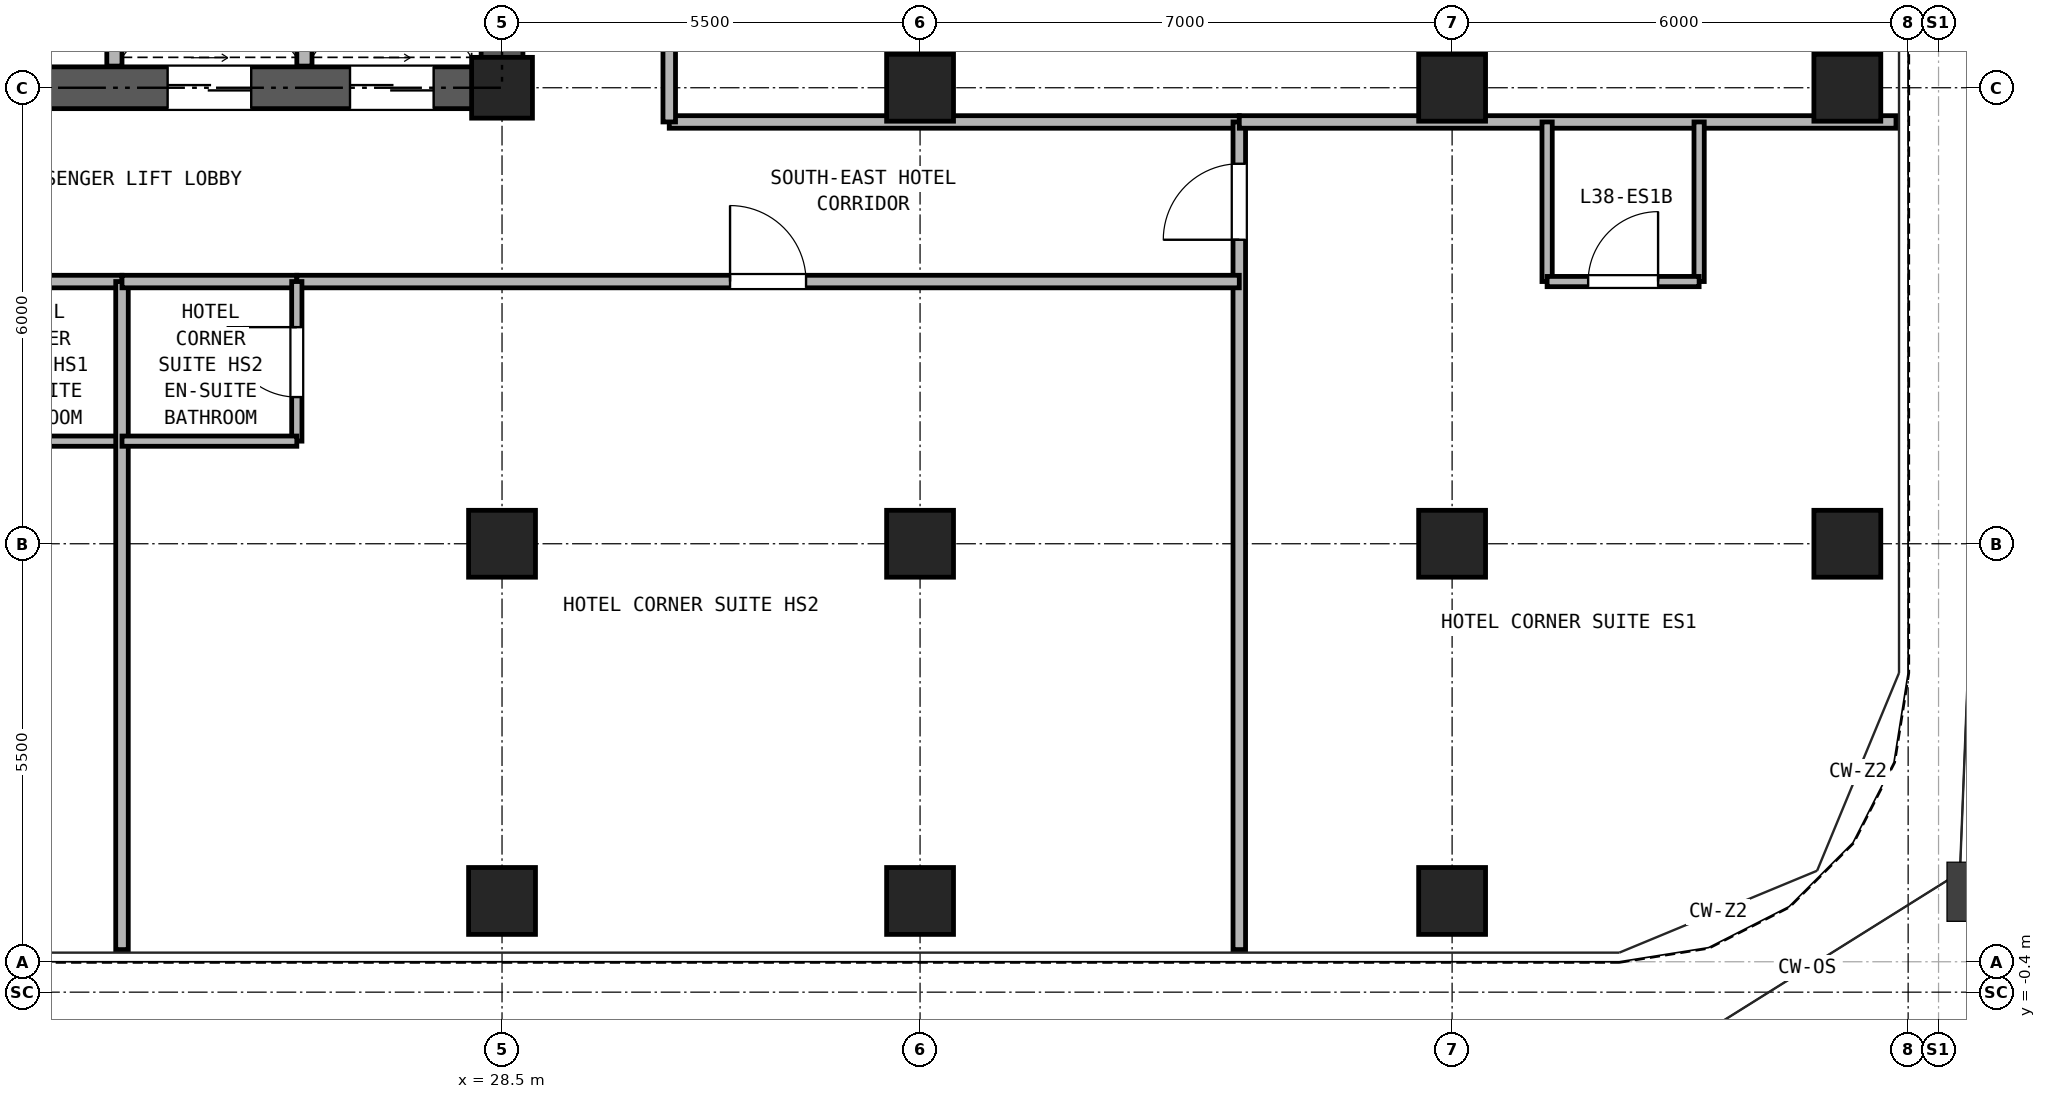
"""IFC4 building model, lengths in metres.
Left out: names, types, materials, properties, quantities, classifications, styles, units other than length and angle.
Written with IfcOpenShell. Run it as: python <this file> out.ifc"""

import sys

from ifc_helpers import new_model, si_unit, direction, frame, frame_2d, origin, origin_2d, place, context, subcontext, project, spatial, rectangle, hollow_rectangle, extrude, source, transform, mapped, element, fill, save


model = new_model("IFC4")
c1 = context("Model", 3, precision=1e-05, world=origin(), true_north=direction((0.0, 1.0)))
c2 = subcontext(c1, "Body", "Model", "MODEL_VIEW")
j1 = project(units=[si_unit("LENGTHUNIT", "METRE"), si_unit("PLANEANGLEUNIT", "RADIAN")], contexts=[c1])
p1 = place(None, origin())
s1 = spatial("IfcSite", under=j1, at=p1, CompositionType="ELEMENT")
p2 = place(p1, origin())
s2 = spatial("IfcBuilding", under=s1, at=p2, CompositionType="ELEMENT")
p3 = place(p2, frame((0.0, 0.0, 137.5)))
s3 = spatial("IfcBuildingStorey", under=s2, at=p3, CompositionType="ELEMENT", Elevation=137.5)
m1 = source(origin(), c2, "Body", "SweptSolid", [
    extrude(hollow_rectangle(XDim=0.88, YDim=0.88, WallThickness=0.05, at=origin_2d()), origin(), (0.0, 0.0, 1.0), 2.95),
])
for number, where, z_axis, x_axis in (
    (1, (28.5, 0.8, 0.0), (0.0, 0.0, 1.0), (1.0, 0.0, 0.0)),
    (2, (34.0, 0.8, 0.0), (0.0, 0.0, 1.0), (1.0, 0.0, 0.0)),
    (3, (41.0, 0.8, 0.0), (0.0, 0.0, 1.0), (1.0, 0.0, 0.0)),
    (4, (46.2, 5.5, 0.0), (0.0, 0.0, 1.0), (1.0, 0.0, 0.0)),
    (5, (46.2, 11.5, 0.0), (0.0, 0.0, 1.0), (1.0, 0.0, 0.0)),
    (6, (28.5, 5.5, 0.0), (0.0, 0.0, 1.0), (1.0, 0.0, 0.0)),
):
    element("IfcColumn", number, at=place(p3, frame(where, z_axis=z_axis, x_axis=x_axis)), inside=s3, PredefinedType="COLUMN", context=c2, shape_type="MappedRepresentation", body=[
        mapped(m1, transform((0.0, 0.0, 0.0), x_axis=(1.0, 0.0, 0.0), y_axis=(0.0, 1.0, 0.0), z_axis=(0.0, 0.0, 1.0), scale=1.0)),
    ])
m2 = source(origin(), c2, "Body", "SweptSolid", [
    extrude(hollow_rectangle(XDim=0.8, YDim=0.8, WallThickness=0.045, at=origin_2d()), origin(), (0.0, 0.0, 1.0), 2.95),
])
p4 = place(p3, frame((28.5, 11.5, 0.0), z_axis=(0.0, 0.0, 1.0), x_axis=(1.0, 0.0, 0.0)))
e7 = element("IfcColumn", 7, at=p4, inside=s3, PredefinedType="COLUMN", context=c2, shape_type="MappedRepresentation", body=[
    mapped(m2, transform((0.0, 0.0, 0.0), x_axis=(1.0, 0.0, 0.0), y_axis=(0.0, 1.0, 0.0), z_axis=(0.0, 0.0, 1.0), scale=1.0)),
])
for number, where, z_axis, x_axis in (
    (8, (34.0, 5.5, 0.0), (0.0, 0.0, 1.0), (1.0, 0.0, 0.0)),
    (9, (34.0, 11.5, 0.0), (0.0, 0.0, 1.0), (1.0, 0.0, 0.0)),
    (10, (41.0, 5.5, 0.0), (0.0, 0.0, 1.0), (1.0, 0.0, 0.0)),
    (11, (41.0, 11.5, 0.0), (0.0, 0.0, 1.0), (1.0, 0.0, 0.0)),
):
    element("IfcColumn", number, at=place(p3, frame(where, z_axis=z_axis, x_axis=x_axis)), inside=s3, PredefinedType="COLUMN", context=c2, shape_type="MappedRepresentation", body=[
        mapped(m1, transform((0.0, 0.0, 0.0), x_axis=(1.0, 0.0, 0.0), y_axis=(0.0, 1.0, 0.0), z_axis=(0.0, 0.0, 1.0), scale=1.0)),
    ])
p5 = place(p3, frame((18.225, 11.5, 0.0), z_axis=(0.0, 0.0, 1.0), x_axis=(1.0, 0.0, 0.0)))
e12 = element("IfcWall", 12, at=p5, inside=s3, PredefinedType="SHEAR", context=c2, shape_type="SweptSolid", body=[
    extrude(rectangle(XDim=10.55, YDim=0.55, at=frame_2d((5.275, 0.0))), origin(), (0.0, 0.0, 1.0), 2.95),
])
p6 = place(p5, frame((2.375, 0.0, 0.0)))
e13 = element("IfcOpeningElement", 13, at=p6, cuts=e12, PredefinedType="OPENING", context=c2, shape_type="SweptSolid", body=[
    extrude(rectangle(XDim=0.95, YDim=2.15, at=frame_2d((0.475, 1.075))), frame((0.0, 0.285, 0.0), z_axis=(0.0, -1.0, 0.0), x_axis=(1.0, 0.0, 0.0)), (0.0, 0.0, 1.0), 0.57),
])
p7 = place(p5, frame((5.875, 0.0, 0.0)))
e14 = element("IfcOpeningElement", 14, at=p7, cuts=e12, PredefinedType="OPENING", context=c2, shape_type="SweptSolid", body=[
    extrude(rectangle(XDim=1.1, YDim=2.25, at=frame_2d((0.55, 1.125))), frame((0.0, 0.285, 0.0), z_axis=(0.0, -1.0, 0.0), x_axis=(1.0, 0.0, 0.0)), (0.0, 0.0, 1.0), 0.57),
])
p8 = place(p5, frame((8.275, 0.0, 0.0)))
e15 = element("IfcOpeningElement", 15, at=p8, cuts=e12, PredefinedType="OPENING", context=c2, shape_type="SweptSolid", body=[
    extrude(rectangle(XDim=1.1, YDim=2.25, at=frame_2d((0.55, 1.125))), frame((0.0, 0.285, 0.0), z_axis=(0.0, -1.0, 0.0), x_axis=(1.0, 0.0, 0.0)), (0.0, 0.0, 1.0), 0.57),
])
p9 = place(p3, frame((28.5, 11.775, 0.0), z_axis=(0.0, 0.0, 1.0), x_axis=(0.0, 1.0, 0.0)))
e16 = element("IfcWall", 16, at=p9, inside=s3, PredefinedType="SHEAR", context=c2, shape_type="SweptSolid", body=[
    extrude(rectangle(XDim=16.7, YDim=0.55, at=frame_2d((8.35, 0.0))), origin(), (0.0, 0.0, 1.0), 2.95),
])
p10 = place(p9, frame((7.375, 0.0, 0.0)))
e17 = element("IfcOpeningElement", 17, at=p10, cuts=e16, PredefinedType="OPENING", context=c2, shape_type="SweptSolid", body=[
    extrude(rectangle(XDim=1.15, YDim=2.2, at=frame_2d((0.575, 1.1))), frame((0.0, 0.285, 0.0), z_axis=(0.0, -1.0, 0.0), x_axis=(1.0, 0.0, 0.0)), (0.0, 0.0, 1.0), 0.57),
])
for number, where, z_axis, x_axis in (
    (18, (23.4, 11.785, 0.0), (0.0, 0.0, 1.0), (0.0, 1.0, 0.0)),
    (19, (25.9, 11.785, 0.0), (0.0, 0.0, 1.0), (0.0, 1.0, 0.0)),
):
    element("IfcWall", number, at=place(p3, frame(where, z_axis=z_axis, x_axis=x_axis)), inside=s3, PredefinedType="PARTITIONING", context=c2, shape_type="SweptSolid", body=[
        extrude(rectangle(XDim=3.215, YDim=0.2, at=frame_2d((1.607, 0.0))), origin(), (0.0, 0.0, 1.0), 2.95),
    ])
p11 = place(p3, frame((30.7, 11.05, 0.0), z_axis=(0.0, 0.0, 1.0), x_axis=(1.0, 0.0, 0.0)))
e20 = element("IfcWall", 20, at=p11, inside=s3, PredefinedType="PARTITIONING", context=c2, shape_type="SweptSolid", body=[
    extrude(rectangle(XDim=7.5, YDim=0.165, at=frame_2d((3.75, 0.0))), origin(), (0.0, 0.0, 1.0), 2.95),
])
p12 = place(p3, frame((30.7, 11.05, 0.0), z_axis=(0.0, 0.0, 1.0), x_axis=(0.0, 1.0, 0.0)))
e21 = element("IfcWall", 21, at=p12, inside=s3, PredefinedType="PARTITIONING", context=c2, shape_type="SweptSolid", body=[
    extrude(rectangle(XDim=18.2, YDim=0.165, at=frame_2d((9.1, 0.0))), origin(), (0.0, 0.0, 1.0), 2.95),
])
p13 = place(p12, frame((4.05, 0.0, 0.0)))
e22 = element("IfcOpeningElement", 22, at=p13, cuts=e21, PredefinedType="OPENING", context=c2, shape_type="SweptSolid", body=[
    extrude(rectangle(XDim=0.95, YDim=2.15, at=frame_2d((0.475, 1.075))), frame((0.0, 0.093, 0.0), z_axis=(0.0, -1.0, 0.0), x_axis=(1.0, 0.0, 0.0)), (0.0, 0.0, 1.0), 0.185),
])
p14 = place(p12, frame((13.15, 0.0, 0.0)))
e23 = element("IfcOpeningElement", 23, at=p14, cuts=e21, PredefinedType="OPENING", context=c2, shape_type="SweptSolid", body=[
    extrude(rectangle(XDim=0.95, YDim=2.15, at=frame_2d((0.475, 1.075))), frame((0.0, 0.093, 0.0), z_axis=(0.0, -1.0, 0.0), x_axis=(1.0, 0.0, 0.0)), (0.0, 0.0, 1.0), 0.185),
])
p15 = place(p3, frame((38.2, 0.16, 0.0), z_axis=(0.0, 0.0, 1.0), x_axis=(0.0, 1.0, 0.0)))
e24 = element("IfcWall", 24, at=p15, inside=s3, PredefinedType="PARTITIONING", context=c2, shape_type="SweptSolid", body=[
    extrude(rectangle(XDim=10.89, YDim=0.165, at=frame_2d((5.445, 0.0))), origin(), (0.0, 0.0, 1.0), 2.95),
])
p16 = place(p15, frame((9.34, 0.0, 0.0)))
e25 = element("IfcOpeningElement", 25, at=p16, cuts=e24, PredefinedType="OPENING", context=c2, shape_type="SweptSolid", body=[
    extrude(rectangle(XDim=1.0, YDim=2.15, at=frame_2d((0.5, 1.075))), frame((0.0, 0.093, 0.0), z_axis=(0.0, -1.0, 0.0), x_axis=(1.0, 0.0, 0.0)), (0.0, 0.0, 1.0), 0.185),
])
p17 = place(p3, frame((38.2, 11.05, 0.0), z_axis=(0.0, 0.0, 1.0), x_axis=(1.0, 0.0, 0.0)))
e26 = element("IfcWall", 26, at=p17, inside=s3, PredefinedType="PARTITIONING", context=c2, shape_type="SweptSolid", body=[
    extrude(rectangle(XDim=8.64, YDim=0.165, at=frame_2d((4.32, 0.0))), origin(), (0.0, 0.0, 1.0), 2.95),
])
for number, where, z_axis, x_axis in (
    (27, (42.25, 8.95, 0.0), (0.0, 0.0, 1.0), (0.0, 1.0, 0.0)),
    (28, (44.25, 8.95, 0.0), (0.0, 0.0, 1.0), (0.0, 1.0, 0.0)),
):
    element("IfcWall", number, at=place(p3, frame(where, z_axis=z_axis, x_axis=x_axis)), inside=s3, PredefinedType="PARTITIONING", context=c2, shape_type="SweptSolid", body=[
        extrude(rectangle(XDim=2.1, YDim=0.135, at=frame_2d((1.05, 0.0))), origin(), (0.0, 0.0, 1.0), 2.95),
    ])
p18 = place(p3, frame((42.25, 8.95, 0.0), z_axis=(0.0, 0.0, 1.0), x_axis=(1.0, 0.0, 0.0)))
e29 = element("IfcWall", 29, at=p18, inside=s3, PredefinedType="PARTITIONING", context=c2, shape_type="SweptSolid", body=[
    extrude(rectangle(XDim=2.0, YDim=0.135, at=frame_2d((1.0, 0.0))), origin(), (0.0, 0.0, 1.0), 2.95),
])
p19 = place(p18, frame((0.54, 0.0, 0.0)))
e30 = element("IfcOpeningElement", 30, at=p19, cuts=e29, PredefinedType="OPENING", context=c2, shape_type="SweptSolid", body=[
    extrude(rectangle(XDim=0.92, YDim=2.1, at=frame_2d((0.46, 1.05))), frame((0.0, 0.077, 0.0), z_axis=(0.0, -1.0, 0.0), x_axis=(1.0, 0.0, 0.0)), (0.0, 0.0, 1.0), 0.155),
])
p20 = place(p3, frame((21.2, 8.95, 0.0), z_axis=(0.0, 0.0, 1.0), x_axis=(1.0, 0.0, 0.0)))
e31 = element("IfcWall", 31, at=p20, inside=s3, PredefinedType="PARTITIONING", context=c2, shape_type="SweptSolid", body=[
    extrude(rectangle(XDim=2.3, YDim=0.165, at=frame_2d((1.15, 0.0))), origin(), (0.0, 0.0, 1.0), 2.95),
])
p21 = place(p3, frame((21.2, 6.85, 0.0), z_axis=(0.0, 0.0, 1.0), x_axis=(1.0, 0.0, 0.0)))
e32 = element("IfcWall", 32, at=p21, inside=s3, PredefinedType="PARTITIONING", context=c2, shape_type="SweptSolid", body=[
    extrude(rectangle(XDim=2.3, YDim=0.135, at=frame_2d((1.15, 0.0))), origin(), (0.0, 0.0, 1.0), 2.95),
])
p22 = place(p3, frame((23.5, 0.16, 0.0), z_axis=(0.0, 0.0, 1.0), x_axis=(0.0, 1.0, 0.0)))
e33 = element("IfcWall", 33, at=p22, inside=s3, PredefinedType="PARTITIONING", context=c2, shape_type="SweptSolid", body=[
    extrude(rectangle(XDim=8.79, YDim=0.165, at=frame_2d((4.395, 0.0))), origin(), (0.0, 0.0, 1.0), 2.95),
])
p23 = place(p3, frame((23.5, 8.95, 0.0), z_axis=(0.0, 0.0, 1.0), x_axis=(1.0, 0.0, 0.0)))
e34 = element("IfcWall", 34, at=p23, inside=s3, PredefinedType="PARTITIONING", context=c2, shape_type="SweptSolid", body=[
    extrude(rectangle(XDim=2.3, YDim=0.165, at=frame_2d((1.15, 0.0))), origin(), (0.0, 0.0, 1.0), 2.95),
])
p24 = place(p3, frame((25.8, 8.95, 0.0), z_axis=(0.0, 0.0, 1.0), x_axis=(1.0, 0.0, 0.0)))
e35 = element("IfcWall", 35, at=p24, inside=s3, PredefinedType="PARTITIONING", context=c2, shape_type="SweptSolid", body=[
    extrude(rectangle(XDim=12.4, YDim=0.165, at=frame_2d((6.2, 0.0))), origin(), (0.0, 0.0, 1.0), 2.95),
])
p25 = place(p24, frame((5.7, 0.0, 0.0)))
e36 = element("IfcOpeningElement", 36, at=p25, cuts=e35, PredefinedType="OPENING", context=c2, shape_type="SweptSolid", body=[
    extrude(rectangle(XDim=1.0, YDim=2.15, at=frame_2d((0.5, 1.075))), frame((0.0, 0.093, 0.0), z_axis=(0.0, -1.0, 0.0), x_axis=(1.0, 0.0, 0.0)), (0.0, 0.0, 1.0), 0.185),
])
p26 = place(p3, frame((25.8, 6.85, 0.0), z_axis=(0.0, 0.0, 1.0), x_axis=(0.0, 1.0, 0.0)))
e37 = element("IfcWall", 37, at=p26, inside=s3, PredefinedType="PARTITIONING", context=c2, shape_type="SweptSolid", body=[
    extrude(rectangle(XDim=2.1, YDim=0.135, at=frame_2d((1.05, 0.0))), origin(), (0.0, 0.0, 1.0), 2.95),
])
p27 = place(p26, frame((0.58, 0.0, 0.0)))
e38 = element("IfcOpeningElement", 38, at=p27, cuts=e37, PredefinedType="OPENING", context=c2, shape_type="SweptSolid", body=[
    extrude(rectangle(XDim=0.92, YDim=2.1, at=frame_2d((0.46, 1.05))), frame((0.0, 0.077, 0.0), z_axis=(0.0, -1.0, 0.0), x_axis=(1.0, 0.0, 0.0)), (0.0, 0.0, 1.0), 0.155),
])
p28 = place(p3, frame((23.5, 6.85, 0.0), z_axis=(0.0, 0.0, 1.0), x_axis=(1.0, 0.0, 0.0)))
e39 = element("IfcWall", 39, at=p28, inside=s3, PredefinedType="PARTITIONING", context=c2, shape_type="SweptSolid", body=[
    extrude(rectangle(XDim=2.3, YDim=0.135, at=frame_2d((1.15, 0.0))), origin(), (0.0, 0.0, 1.0), 2.95),
])
p29 = place(p7, frame((1.1, 0.0, 0.0), z_axis=(0.0, 0.0, 1.0), x_axis=(-1.0, 0.0, 0.0)))
e40 = element("IfcDoor", 40, at=p29, inside=s3, OperationType="DOUBLE_DOOR_SLIDING", PredefinedType="DOOR", context=c2, shape_type="SweptSolid", body=[
    extrude(rectangle(XDim=1.1, YDim=2.25, at=frame_2d((0.55, 1.125))), frame((0.0, 0.025, 0.0), z_axis=(0.0, -1.0, 0.0), x_axis=(1.0, 0.0, 0.0)), (0.0, 0.0, 1.0), 0.05),
])
fill(e14, e40)
p30 = place(p8, frame((1.1, 0.0, 0.0), z_axis=(0.0, 0.0, 1.0), x_axis=(-1.0, 0.0, 0.0)))
e41 = element("IfcDoor", 41, at=p30, inside=s3, OperationType="DOUBLE_DOOR_SLIDING", PredefinedType="DOOR", context=c2, shape_type="SweptSolid", body=[
    extrude(rectangle(XDim=1.1, YDim=2.25, at=frame_2d((0.55, 1.125))), frame((0.0, 0.025, 0.0), z_axis=(0.0, -1.0, 0.0), x_axis=(1.0, 0.0, 0.0)), (0.0, 0.0, 1.0), 0.05),
])
fill(e15, e41)
p31 = place(p19, origin())
e42 = element("IfcDoor", 42, at=p31, inside=s3, OperationType="SINGLE_SWING_RIGHT", PredefinedType="DOOR", context=c2, shape_type="SweptSolid", body=[
    extrude(rectangle(XDim=0.92, YDim=2.1, at=frame_2d((0.46, 1.05))), frame((0.0, 0.025, 0.0), z_axis=(0.0, -1.0, 0.0), x_axis=(1.0, 0.0, 0.0)), (0.0, 0.0, 1.0), 0.05),
])
fill(e30, e42)
p32 = place(p16, frame((1.0, 0.0, 0.0), z_axis=(0.0, 0.0, 1.0), x_axis=(-1.0, 0.0, 0.0)))
e43 = element("IfcDoor", 43, at=p32, inside=s3, OperationType="SINGLE_SWING_LEFT", PredefinedType="DOOR", context=c2, shape_type="SweptSolid", body=[
    extrude(rectangle(XDim=1.0, YDim=2.15, at=frame_2d((0.5, 1.075))), frame((0.0, 0.025, 0.0), z_axis=(0.0, -1.0, 0.0), x_axis=(1.0, 0.0, 0.0)), (0.0, 0.0, 1.0), 0.05),
])
fill(e25, e43)
p33 = place(p27, frame((0.92, 0.0, 0.0), z_axis=(0.0, 0.0, 1.0), x_axis=(-1.0, 0.0, 0.0)))
e44 = element("IfcDoor", 44, at=p33, inside=s3, OperationType="SINGLE_SWING_RIGHT", PredefinedType="DOOR", context=c2, shape_type="SweptSolid", body=[
    extrude(rectangle(XDim=0.92, YDim=2.1, at=frame_2d((0.46, 1.05))), frame((0.0, 0.025, 0.0), z_axis=(0.0, -1.0, 0.0), x_axis=(1.0, 0.0, 0.0)), (0.0, 0.0, 1.0), 0.05),
])
fill(e38, e44)
p34 = place(p25, frame((1.0, 0.0, 0.0), z_axis=(0.0, 0.0, 1.0), x_axis=(-1.0, 0.0, 0.0)))
e45 = element("IfcDoor", 45, at=p34, inside=s3, OperationType="SINGLE_SWING_LEFT", PredefinedType="DOOR", context=c2, shape_type="SweptSolid", body=[
    extrude(rectangle(XDim=1.0, YDim=2.15, at=frame_2d((0.5, 1.075))), frame((0.0, 0.025, 0.0), z_axis=(0.0, -1.0, 0.0), x_axis=(1.0, 0.0, 0.0)), (0.0, 0.0, 1.0), 0.05),
])
fill(e36, e45)
save(model, sys.argv[1])
